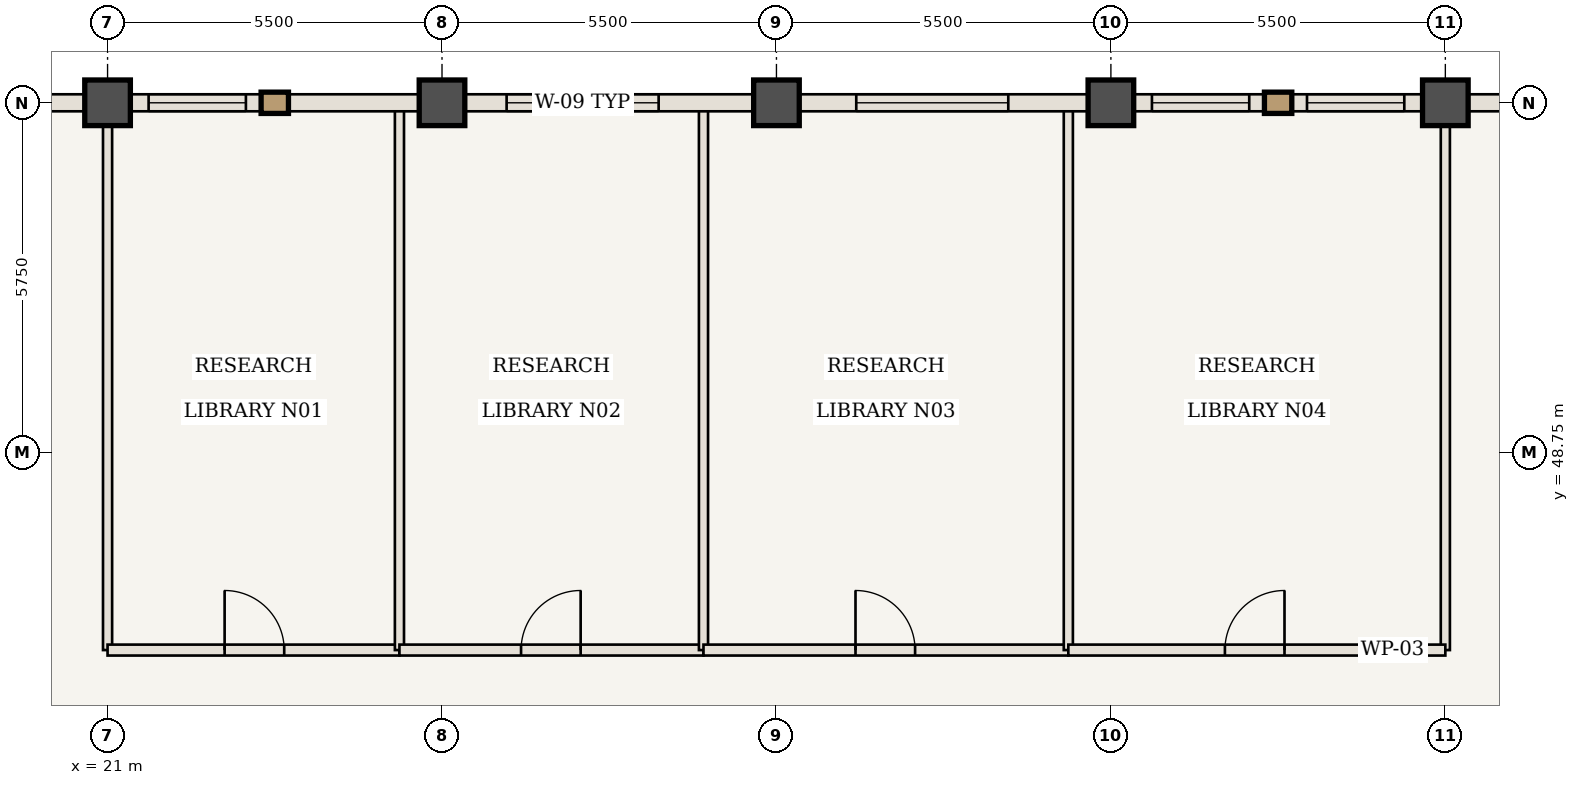
"""IFC4 building model, lengths in metres.
Left out: names, types, materials, properties, quantities, classifications, styles, units other than length and angle.
Written with IfcOpenShell. Run it as: python <this file> out.ifc"""

import sys

from ifc_helpers import new_model, si_unit, direction, frame, frame_2d, origin, origin_2d, place, context, subcontext, project, spatial, rectangle, extrude, element, fill, save


model = new_model("IFC4")
c1 = context("Model", 3, precision=1e-05, world=origin(), true_north=direction((0.0, 1.0)))
c2 = subcontext(c1, "Body", "Model", "MODEL_VIEW")
j1 = project(units=[si_unit("LENGTHUNIT", "METRE"), si_unit("PLANEANGLEUNIT", "RADIAN")], contexts=[c1])
p1 = place(None, origin())
s1 = spatial("IfcSite", under=j1, at=p1, CompositionType="ELEMENT")
p2 = place(p1, origin())
s2 = spatial("IfcBuilding", under=s1, at=p2, CompositionType="ELEMENT")
p3 = place(p2, frame((0.0, 0.0, 285.25)))
s3 = spatial("IfcBuildingStorey", under=s2, at=p3, CompositionType="ELEMENT", Elevation=285.25)
for number, where, z_axis, x_axis in (
    (1, (21.0, 54.5, 0.0), (0.0, 0.0, 1.0), (1.0, 0.0, 0.0)),
    (2, (26.5, 54.5, 0.0), (0.0, 0.0, 1.0), (1.0, 0.0, 0.0)),
    (3, (32.0, 54.5, 0.0), (0.0, 0.0, 1.0), (1.0, 0.0, 0.0)),
    (4, (37.5, 54.5, 0.0), (0.0, 0.0, 1.0), (1.0, 0.0, 0.0)),
    (5, (43.0, 54.5, 0.0), (0.0, 0.0, 1.0), (1.0, 0.0, 0.0)),
):
    element("IfcColumn", number, at=place(p3, frame(where, z_axis=z_axis, x_axis=x_axis)), inside=s3, PredefinedType="COLUMN", context=c2, shape_type="SweptSolid", body=[
        extrude(rectangle(XDim=0.75, YDim=0.75, at=origin_2d()), origin(), (0.0, 0.0, 1.0), 3.85),
    ])
for number, where, z_axis, x_axis in (
    (6, (21.0, 45.5, 0.0), (0.0, 0.0, 1.0), (0.0, 1.0, 0.0)),
    (7, (43.0, 45.5, 0.0), (0.0, 0.0, 1.0), (0.0, 1.0, 0.0)),
):
    element("IfcWall", number, at=place(p3, frame(where, z_axis=z_axis, x_axis=x_axis)), inside=s3, PredefinedType="STANDARD", context=c2, shape_type="SweptSolid", body=[
        extrude(rectangle(XDim=8.94, YDim=0.15, at=frame_2d((4.47, 0.0))), origin(), (0.0, 0.0, 1.0), 3.685),
    ])
p4 = place(p3, frame((21.0, 45.5, 0.0), z_axis=(0.0, 0.0, 1.0), x_axis=(1.0, 0.0, 0.0)))
e8 = element("IfcWall", 8, at=p4, inside=s3, PredefinedType="STANDARD", context=c2, shape_type="SweptSolid", body=[
    extrude(rectangle(XDim=4.8, YDim=0.18, at=frame_2d((2.4, 0.0))), origin(), (0.0, 0.0, 1.0), 3.685),
])
p5 = place(p4, frame((1.925, 0.0, 0.0)))
e9 = element("IfcOpeningElement", 9, at=p5, cuts=e8, PredefinedType="OPENING", context=c2, shape_type="SweptSolid", body=[
    extrude(rectangle(XDim=0.98, YDim=2.2, at=frame_2d((0.49, 1.1))), frame((0.0, 0.1, 0.0), z_axis=(0.0, -1.0, 0.0), x_axis=(1.0, 0.0, 0.0)), (0.0, 0.0, 1.0), 0.2),
])
p6 = place(p3, frame((25.8, 45.5, 0.0), z_axis=(0.0, 0.0, 1.0), x_axis=(0.0, 1.0, 0.0)))
e10 = element("IfcWall", 10, at=p6, inside=s3, PredefinedType="STANDARD", context=c2, shape_type="SweptSolid", body=[
    extrude(rectangle(XDim=8.94, YDim=0.15, at=frame_2d((4.47, 0.0))), origin(), (0.0, 0.0, 1.0), 3.685),
])
p7 = place(p3, frame((25.8, 45.5, 0.0), z_axis=(0.0, 0.0, 1.0), x_axis=(1.0, 0.0, 0.0)))
e11 = element("IfcWall", 11, at=p7, inside=s3, PredefinedType="STANDARD", context=c2, shape_type="SweptSolid", body=[
    extrude(rectangle(XDim=5.0, YDim=0.18, at=frame_2d((2.5, 0.0))), origin(), (0.0, 0.0, 1.0), 3.685),
])
p8 = place(p7, frame((2.0, 0.0, 0.0)))
e12 = element("IfcOpeningElement", 12, at=p8, cuts=e11, PredefinedType="OPENING", context=c2, shape_type="SweptSolid", body=[
    extrude(rectangle(XDim=0.98, YDim=2.2, at=frame_2d((0.49, 1.1))), frame((0.0, 0.1, 0.0), z_axis=(0.0, -1.0, 0.0), x_axis=(1.0, 0.0, 0.0)), (0.0, 0.0, 1.0), 0.2),
])
p9 = place(p3, frame((30.8, 45.5, 0.0), z_axis=(0.0, 0.0, 1.0), x_axis=(0.0, 1.0, 0.0)))
e13 = element("IfcWall", 13, at=p9, inside=s3, PredefinedType="STANDARD", context=c2, shape_type="SweptSolid", body=[
    extrude(rectangle(XDim=8.94, YDim=0.15, at=frame_2d((4.47, 0.0))), origin(), (0.0, 0.0, 1.0), 3.685),
])
p10 = place(p3, frame((30.8, 45.5, 0.0), z_axis=(0.0, 0.0, 1.0), x_axis=(1.0, 0.0, 0.0)))
e14 = element("IfcWall", 14, at=p10, inside=s3, PredefinedType="STANDARD", context=c2, shape_type="SweptSolid", body=[
    extrude(rectangle(XDim=6.0, YDim=0.18, at=frame_2d((3.0, 0.0))), origin(), (0.0, 0.0, 1.0), 3.685),
])
p11 = place(p10, frame((2.5, 0.0, 0.0)))
e15 = element("IfcOpeningElement", 15, at=p11, cuts=e14, PredefinedType="OPENING", context=c2, shape_type="SweptSolid", body=[
    extrude(rectangle(XDim=0.98, YDim=2.2, at=frame_2d((0.49, 1.1))), frame((0.0, 0.1, 0.0), z_axis=(0.0, -1.0, 0.0), x_axis=(1.0, 0.0, 0.0)), (0.0, 0.0, 1.0), 0.2),
])
p12 = place(p3, frame((36.8, 45.5, 0.0), z_axis=(0.0, 0.0, 1.0), x_axis=(0.0, 1.0, 0.0)))
e16 = element("IfcWall", 16, at=p12, inside=s3, PredefinedType="STANDARD", context=c2, shape_type="SweptSolid", body=[
    extrude(rectangle(XDim=8.94, YDim=0.15, at=frame_2d((4.47, 0.0))), origin(), (0.0, 0.0, 1.0), 3.685),
])
p13 = place(p3, frame((36.8, 45.5, 0.0), z_axis=(0.0, 0.0, 1.0), x_axis=(1.0, 0.0, 0.0)))
e17 = element("IfcWall", 17, at=p13, inside=s3, PredefinedType="STANDARD", context=c2, shape_type="SweptSolid", body=[
    extrude(rectangle(XDim=6.2, YDim=0.18, at=frame_2d((3.1, 0.0))), origin(), (0.0, 0.0, 1.0), 3.685),
])
p14 = place(p13, frame((2.575, 0.0, 0.0)))
e18 = element("IfcOpeningElement", 18, at=p14, cuts=e17, PredefinedType="OPENING", context=c2, shape_type="SweptSolid", body=[
    extrude(rectangle(XDim=0.98, YDim=2.2, at=frame_2d((0.49, 1.1))), frame((0.0, 0.1, 0.0), z_axis=(0.0, -1.0, 0.0), x_axis=(1.0, 0.0, 0.0)), (0.0, 0.0, 1.0), 0.2),
])
p15 = place(p3, frame((15.5, 54.5, 0.0), z_axis=(0.0, 0.0, 1.0), x_axis=(1.0, 0.0, 0.0)))
e19 = element("IfcWall", 19, at=p15, inside=s3, PredefinedType="USERDEFINED", context=c2, shape_type="SweptSolid", body=[
    extrude(rectangle(XDim=5.5, YDim=0.28, at=frame_2d((2.75, 0.0))), origin(), (0.0, 0.0, 1.0), 2.985),
])
p16 = place(p3, frame((21.0, 54.5, 0.0), z_axis=(0.0, 0.0, 1.0), x_axis=(1.0, 0.0, 0.0)))
e20 = element("IfcWall", 20, at=p16, inside=s3, PredefinedType="USERDEFINED", context=c2, shape_type="SweptSolid", body=[
    extrude(rectangle(XDim=5.5, YDim=0.28, at=frame_2d((2.75, 0.0))), origin(), (0.0, 0.0, 1.0), 2.985),
])
p17 = place(p16, frame((0.675, 0.0, 0.85)))
e21 = element("IfcOpeningElement", 21, at=p17, cuts=e20, PredefinedType="OPENING", context=c2, shape_type="SweptSolid", body=[
    extrude(rectangle(XDim=1.6, YDim=1.935, at=frame_2d((0.8, 0.968))), frame((0.0, 0.15, 0.0), z_axis=(0.0, -1.0, 0.0), x_axis=(1.0, 0.0, 0.0)), (0.0, 0.0, 1.0), 0.3),
])
p18 = place(p3, frame((26.5, 54.5, 0.0), z_axis=(0.0, 0.0, 1.0), x_axis=(1.0, 0.0, 0.0)))
e22 = element("IfcWall", 22, at=p18, inside=s3, PredefinedType="USERDEFINED", context=c2, shape_type="SweptSolid", body=[
    extrude(rectangle(XDim=5.5, YDim=0.28, at=frame_2d((2.75, 0.0))), origin(), (0.0, 0.0, 1.0), 2.985),
])
p19 = place(p18, frame((1.062, 0.0, 0.85)))
e23 = element("IfcOpeningElement", 23, at=p19, cuts=e22, PredefinedType="OPENING", context=c2, shape_type="SweptSolid", body=[
    extrude(rectangle(XDim=2.5, YDim=1.935, at=frame_2d((1.25, 0.968))), frame((0.0, 0.15, 0.0), z_axis=(0.0, -1.0, 0.0), x_axis=(1.0, 0.0, 0.0)), (0.0, 0.0, 1.0), 0.3),
])
p20 = place(p3, frame((32.0, 54.5, 0.0), z_axis=(0.0, 0.0, 1.0), x_axis=(1.0, 0.0, 0.0)))
e24 = element("IfcWall", 24, at=p20, inside=s3, PredefinedType="USERDEFINED", context=c2, shape_type="SweptSolid", body=[
    extrude(rectangle(XDim=5.5, YDim=0.28, at=frame_2d((2.75, 0.0))), origin(), (0.0, 0.0, 1.0), 2.985),
])
p21 = place(p20, frame((1.312, 0.0, 0.85)))
e25 = element("IfcOpeningElement", 25, at=p21, cuts=e24, PredefinedType="OPENING", context=c2, shape_type="SweptSolid", body=[
    extrude(rectangle(XDim=2.5, YDim=1.935, at=frame_2d((1.25, 0.968))), frame((0.0, 0.15, 0.0), z_axis=(0.0, -1.0, 0.0), x_axis=(1.0, 0.0, 0.0)), (0.0, 0.0, 1.0), 0.3),
])
p22 = place(p3, frame((37.5, 54.5, 0.0), z_axis=(0.0, 0.0, 1.0), x_axis=(1.0, 0.0, 0.0)))
e26 = element("IfcWall", 26, at=p22, inside=s3, PredefinedType="USERDEFINED", context=c2, shape_type="SweptSolid", body=[
    extrude(rectangle(XDim=5.5, YDim=0.28, at=frame_2d((2.75, 0.0))), origin(), (0.0, 0.0, 1.0), 2.985),
])
p23 = place(p22, frame((0.675, 0.0, 0.85)))
e27 = element("IfcOpeningElement", 27, at=p23, cuts=e26, PredefinedType="OPENING", context=c2, shape_type="SweptSolid", body=[
    extrude(rectangle(XDim=1.6, YDim=1.935, at=frame_2d((0.8, 0.968))), frame((0.0, 0.15, 0.0), z_axis=(0.0, -1.0, 0.0), x_axis=(1.0, 0.0, 0.0)), (0.0, 0.0, 1.0), 0.3),
])
p24 = place(p22, frame((3.225, 0.0, 0.85)))
e28 = element("IfcOpeningElement", 28, at=p24, cuts=e26, PredefinedType="OPENING", context=c2, shape_type="SweptSolid", body=[
    extrude(rectangle(XDim=1.6, YDim=1.935, at=frame_2d((0.8, 0.968))), frame((0.0, 0.15, 0.0), z_axis=(0.0, -1.0, 0.0), x_axis=(1.0, 0.0, 0.0)), (0.0, 0.0, 1.0), 0.3),
])
p25 = place(p3, frame((43.0, 54.5, 0.0), z_axis=(0.0, 0.0, 1.0), x_axis=(1.0, 0.0, 0.0)))
e29 = element("IfcWall", 29, at=p25, inside=s3, PredefinedType="USERDEFINED", context=c2, shape_type="SweptSolid", body=[
    extrude(rectangle(XDim=5.5, YDim=0.28, at=frame_2d((2.75, 0.0))), origin(), (0.0, 0.0, 1.0), 2.985),
])
p26 = place(p5, origin())
e30 = element("IfcDoor", 30, at=p26, inside=s3, OperationType="SINGLE_SWING_LEFT", PredefinedType="DOOR", context=c2, shape_type="SweptSolid", body=[
    extrude(rectangle(XDim=0.98, YDim=2.2, at=frame_2d((0.49, 1.1))), frame((0.0, 0.025, 0.0), z_axis=(0.0, -1.0, 0.0), x_axis=(1.0, 0.0, 0.0)), (0.0, 0.0, 1.0), 0.05),
])
fill(e9, e30)
p27 = place(p8, origin())
e31 = element("IfcDoor", 31, at=p27, inside=s3, OperationType="SINGLE_SWING_RIGHT", PredefinedType="DOOR", context=c2, shape_type="SweptSolid", body=[
    extrude(rectangle(XDim=0.98, YDim=2.2, at=frame_2d((0.49, 1.1))), frame((0.0, 0.025, 0.0), z_axis=(0.0, -1.0, 0.0), x_axis=(1.0, 0.0, 0.0)), (0.0, 0.0, 1.0), 0.05),
])
fill(e12, e31)
p28 = place(p11, origin())
e32 = element("IfcDoor", 32, at=p28, inside=s3, OperationType="SINGLE_SWING_LEFT", PredefinedType="DOOR", context=c2, shape_type="SweptSolid", body=[
    extrude(rectangle(XDim=0.98, YDim=2.2, at=frame_2d((0.49, 1.1))), frame((0.0, 0.025, 0.0), z_axis=(0.0, -1.0, 0.0), x_axis=(1.0, 0.0, 0.0)), (0.0, 0.0, 1.0), 0.05),
])
fill(e15, e32)
p29 = place(p14, origin())
e33 = element("IfcDoor", 33, at=p29, inside=s3, OperationType="SINGLE_SWING_RIGHT", PredefinedType="DOOR", context=c2, shape_type="SweptSolid", body=[
    extrude(rectangle(XDim=0.98, YDim=2.2, at=frame_2d((0.49, 1.1))), frame((0.0, 0.025, 0.0), z_axis=(0.0, -1.0, 0.0), x_axis=(1.0, 0.0, 0.0)), (0.0, 0.0, 1.0), 0.05),
])
fill(e18, e33)
p30 = place(p17, origin())
e34 = element("IfcWindow", 34, at=p30, inside=s3, PartitioningType="SINGLE_PANEL", PredefinedType="WINDOW", context=c2, shape_type="SweptSolid", body=[
    extrude(rectangle(XDim=1.6, YDim=1.935, at=frame_2d((0.8, 0.968))), frame((0.0, 0.03, 0.0), z_axis=(0.0, -1.0, 0.0), x_axis=(1.0, 0.0, 0.0)), (0.0, 0.0, 1.0), 0.06),
])
fill(e21, e34)
p31 = place(p19, origin())
e35 = element("IfcWindow", 35, at=p31, inside=s3, PartitioningType="SINGLE_PANEL", PredefinedType="WINDOW", context=c2, shape_type="SweptSolid", body=[
    extrude(rectangle(XDim=2.5, YDim=1.935, at=frame_2d((1.25, 0.968))), frame((0.0, 0.03, 0.0), z_axis=(0.0, -1.0, 0.0), x_axis=(1.0, 0.0, 0.0)), (0.0, 0.0, 1.0), 0.06),
])
fill(e23, e35)
p32 = place(p21, origin())
e36 = element("IfcWindow", 36, at=p32, inside=s3, PartitioningType="SINGLE_PANEL", PredefinedType="WINDOW", context=c2, shape_type="SweptSolid", body=[
    extrude(rectangle(XDim=2.5, YDim=1.935, at=frame_2d((1.25, 0.968))), frame((0.0, 0.03, 0.0), z_axis=(0.0, -1.0, 0.0), x_axis=(1.0, 0.0, 0.0)), (0.0, 0.0, 1.0), 0.06),
])
fill(e25, e36)
p33 = place(p23, origin())
e37 = element("IfcWindow", 37, at=p33, inside=s3, PartitioningType="SINGLE_PANEL", PredefinedType="WINDOW", context=c2, shape_type="SweptSolid", body=[
    extrude(rectangle(XDim=1.6, YDim=1.935, at=frame_2d((0.8, 0.968))), frame((0.0, 0.03, 0.0), z_axis=(0.0, -1.0, 0.0), x_axis=(1.0, 0.0, 0.0)), (0.0, 0.0, 1.0), 0.06),
])
fill(e27, e37)
p34 = place(p24, origin())
e38 = element("IfcWindow", 38, at=p34, inside=s3, PartitioningType="SINGLE_PANEL", PredefinedType="WINDOW", context=c2, shape_type="SweptSolid", body=[
    extrude(rectangle(XDim=1.6, YDim=1.935, at=frame_2d((0.8, 0.968))), frame((0.0, 0.03, 0.0), z_axis=(0.0, -1.0, 0.0), x_axis=(1.0, 0.0, 0.0)), (0.0, 0.0, 1.0), 0.06),
])
fill(e28, e38)
save(model, sys.argv[1])
